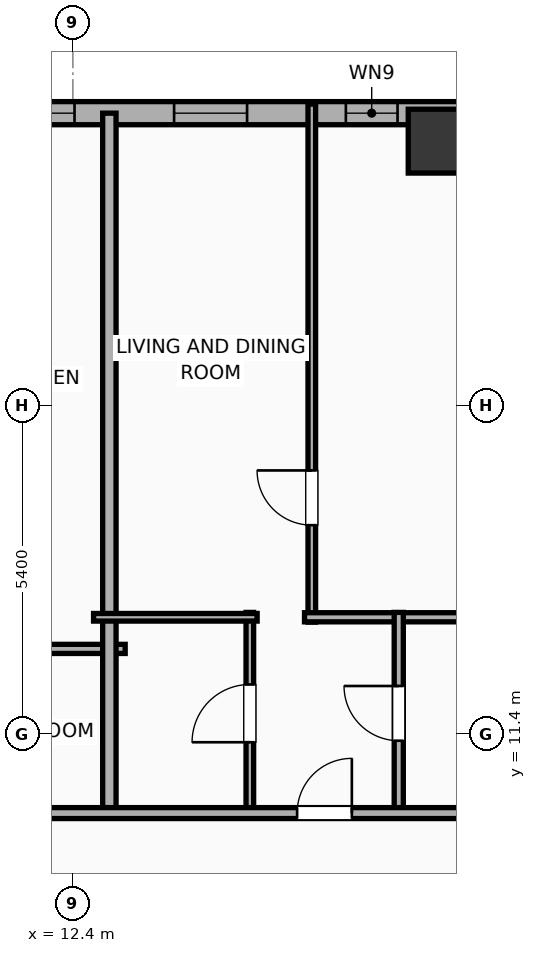
"""IFC4 building model, lengths in metres.
Left out: names, types, materials, properties, quantities, classifications, styles, units other than length and angle.
Written with IfcOpenShell. Run it as: python <this file> out.ifc"""

import sys

from ifc_helpers import new_model, si_unit, direction, frame, frame_2d, origin, origin_2d, place, context, subcontext, project, spatial, rectangle, hollow_rectangle, extrude, element, fill, save


model = new_model("IFC4")
c1 = context("Model", 3, precision=1e-05, world=origin(), true_north=direction((0.0, 1.0)))
c2 = subcontext(c1, "Body", "Model", "MODEL_VIEW")
j1 = project(units=[si_unit("LENGTHUNIT", "METRE"), si_unit("PLANEANGLEUNIT", "RADIAN")], contexts=[c1])
p1 = place(None, origin())
s1 = spatial("IfcSite", under=j1, at=p1, CompositionType="ELEMENT")
p2 = place(p1, origin())
s2 = spatial("IfcBuilding", under=s1, at=p2, CompositionType="ELEMENT")
p3 = place(p2, frame((0.0, 0.0, 124.8)))
s3 = spatial("IfcBuildingStorey", under=s2, at=p3, CompositionType="ELEMENT", Elevation=124.8)
p4 = place(p3, frame((18.44, 21.15, 0.0), z_axis=(0.0, 0.0, 1.0), x_axis=(1.0, 0.0, 0.0)))
e1 = element("IfcColumn", 1, at=p4, inside=s3, PredefinedType="COLUMN", context=c2, shape_type="SweptSolid", body=[
    extrude(hollow_rectangle(XDim=1.05, YDim=1.05, WallThickness=0.036, at=origin_2d()), origin(), (0.0, 0.0, 1.0), 3.9),
])
p5 = place(p3, frame((-25.381, 21.61, 0.0), z_axis=(0.0, 0.0, 1.0), x_axis=(1.0, 0.0, 0.0)))
e2 = element("IfcWall", 2, at=p5, inside=s3, PredefinedType="ELEMENTEDWALL", context=c2, shape_type="SweptSolid", body=[
    extrude(rectangle(XDim=54.763, YDim=0.38, at=frame_2d((27.381, 0.0))), origin(), (0.0, 0.0, 1.0), 3.65),
])
p6 = place(p5, frame((4.795, 0.0, 0.75)))
e3 = element("IfcOpeningElement", 3, at=p6, cuts=e2, PredefinedType="OPENING", context=c2, shape_type="SweptSolid", body=[
    extrude(rectangle(XDim=2.4, YDim=2.1, at=frame_2d((1.2, 1.05))), frame((0.0, 0.2, 0.0), z_axis=(0.0, -1.0, 0.0), x_axis=(1.0, 0.0, 0.0)), (0.0, 0.0, 1.0), 0.4),
])
p7 = place(p5, frame((45.867, 0.0, 0.75)))
e4 = element("IfcOpeningElement", 4, at=p7, cuts=e2, PredefinedType="OPENING", context=c2, shape_type="SweptSolid", body=[
    extrude(rectangle(XDim=2.4, YDim=2.1, at=frame_2d((1.2, 1.05))), frame((0.0, 0.2, 0.0), z_axis=(0.0, -1.0, 0.0), x_axis=(1.0, 0.0, 0.0)), (0.0, 0.0, 1.0), 0.4),
])
p8 = place(p5, frame((2.408, 0.0, 0.75)))
e5 = element("IfcOpeningElement", 5, at=p8, cuts=e2, PredefinedType="OPENING", context=c2, shape_type="SweptSolid", body=[
    extrude(rectangle(XDim=1.2, YDim=2.05, at=frame_2d((0.6, 1.025))), frame((0.0, 0.2, 0.0), z_axis=(0.0, -1.0, 0.0), x_axis=(1.0, 0.0, 0.0)), (0.0, 0.0, 1.0), 0.4),
])
p9 = place(p5, frame((8.952, 0.0, 0.75)))
e6 = element("IfcOpeningElement", 6, at=p9, cuts=e2, PredefinedType="OPENING", context=c2, shape_type="SweptSolid", body=[
    extrude(rectangle(XDim=1.2, YDim=2.05, at=frame_2d((0.6, 1.025))), frame((0.0, 0.2, 0.0), z_axis=(0.0, -1.0, 0.0), x_axis=(1.0, 0.0, 0.0)), (0.0, 0.0, 1.0), 0.4),
])
p10 = place(p5, frame((17.132, 0.0, 0.75)))
e7 = element("IfcOpeningElement", 7, at=p10, cuts=e2, PredefinedType="OPENING", context=c2, shape_type="SweptSolid", body=[
    extrude(rectangle(XDim=1.2, YDim=2.05, at=frame_2d((0.6, 1.025))), frame((0.0, 0.2, 0.0), z_axis=(0.0, -1.0, 0.0), x_axis=(1.0, 0.0, 0.0)), (0.0, 0.0, 1.0), 0.4),
])
p11 = place(p5, frame((14.007, 0.0, 0.75)))
e8 = element("IfcOpeningElement", 8, at=p11, cuts=e2, PredefinedType="OPENING", context=c2, shape_type="SweptSolid", body=[
    extrude(rectangle(XDim=1.2, YDim=2.05, at=frame_2d((0.6, 1.025))), frame((0.0, 0.2, 0.0), z_axis=(0.0, -1.0, 0.0), x_axis=(1.0, 0.0, 0.0)), (0.0, 0.0, 1.0), 0.4),
])
p12 = place(p5, frame((22.636, 0.0, 0.75)))
e9 = element("IfcOpeningElement", 9, at=p12, cuts=e2, PredefinedType="OPENING", context=c2, shape_type="SweptSolid", body=[
    extrude(rectangle(XDim=1.2, YDim=2.05, at=frame_2d((0.6, 1.025))), frame((0.0, 0.2, 0.0), z_axis=(0.0, -1.0, 0.0), x_axis=(1.0, 0.0, 0.0)), (0.0, 0.0, 1.0), 0.4),
])
p13 = place(p5, frame((27.129, 0.0, 0.75)))
e10 = element("IfcOpeningElement", 10, at=p13, cuts=e2, PredefinedType="OPENING", context=c2, shape_type="SweptSolid", body=[
    extrude(rectangle(XDim=1.2, YDim=2.05, at=frame_2d((0.6, 1.025))), frame((0.0, 0.2, 0.0), z_axis=(0.0, -1.0, 0.0), x_axis=(1.0, 0.0, 0.0)), (0.0, 0.0, 1.0), 0.4),
])
p14 = place(p5, frame((30.254, 0.0, 0.75)))
e11 = element("IfcOpeningElement", 11, at=p14, cuts=e2, PredefinedType="OPENING", context=c2, shape_type="SweptSolid", body=[
    extrude(rectangle(XDim=1.2, YDim=2.05, at=frame_2d((0.6, 1.025))), frame((0.0, 0.2, 0.0), z_axis=(0.0, -1.0, 0.0), x_axis=(1.0, 0.0, 0.0)), (0.0, 0.0, 1.0), 0.4),
])
p15 = place(p5, frame((33.603, 0.0, 0.75)))
e12 = element("IfcOpeningElement", 12, at=p15, cuts=e2, PredefinedType="OPENING", context=c2, shape_type="SweptSolid", body=[
    extrude(rectangle(XDim=1.2, YDim=2.05, at=frame_2d((0.6, 1.025))), frame((0.0, 0.2, 0.0), z_axis=(0.0, -1.0, 0.0), x_axis=(1.0, 0.0, 0.0)), (0.0, 0.0, 1.0), 0.4),
])
p16 = place(p5, frame((36.608, 0.0, 0.75)))
e13 = element("IfcOpeningElement", 13, at=p16, cuts=e2, PredefinedType="OPENING", context=c2, shape_type="SweptSolid", body=[
    extrude(rectangle(XDim=1.2, YDim=2.05, at=frame_2d((0.6, 1.025))), frame((0.0, 0.2, 0.0), z_axis=(0.0, -1.0, 0.0), x_axis=(1.0, 0.0, 0.0)), (0.0, 0.0, 1.0), 0.4),
])
p17 = place(p5, frame((39.446, 0.0, 0.75)))
e14 = element("IfcOpeningElement", 14, at=p17, cuts=e2, PredefinedType="OPENING", context=c2, shape_type="SweptSolid", body=[
    extrude(rectangle(XDim=1.2, YDim=2.05, at=frame_2d((0.6, 1.025))), frame((0.0, 0.2, 0.0), z_axis=(0.0, -1.0, 0.0), x_axis=(1.0, 0.0, 0.0)), (0.0, 0.0, 1.0), 0.4),
])
p18 = place(p5, frame((42.27, 0.0, 0.75)))
e15 = element("IfcOpeningElement", 15, at=p18, cuts=e2, PredefinedType="OPENING", context=c2, shape_type="SweptSolid", body=[
    extrude(rectangle(XDim=0.85, YDim=2.05, at=frame_2d((0.425, 1.025))), frame((0.0, 0.2, 0.0), z_axis=(0.0, -1.0, 0.0), x_axis=(1.0, 0.0, 0.0)), (0.0, 0.0, 1.0), 0.4),
])
p19 = place(p5, frame((49.554, 0.0, 0.75)))
e16 = element("IfcOpeningElement", 16, at=p19, cuts=e2, PredefinedType="OPENING", context=c2, shape_type="SweptSolid", body=[
    extrude(rectangle(XDim=1.2, YDim=2.05, at=frame_2d((0.6, 1.025))), frame((0.0, 0.2, 0.0), z_axis=(0.0, -1.0, 0.0), x_axis=(1.0, 0.0, 0.0)), (0.0, 0.0, 1.0), 0.4),
])
p20 = place(p5, frame((52.266, 0.0, 0.75)))
e17 = element("IfcOpeningElement", 17, at=p20, cuts=e2, PredefinedType="OPENING", context=c2, shape_type="SweptSolid", body=[
    extrude(rectangle(XDim=1.2, YDim=2.05, at=frame_2d((0.6, 1.025))), frame((0.0, 0.2, 0.0), z_axis=(0.0, -1.0, 0.0), x_axis=(1.0, 0.0, 0.0)), (0.0, 0.0, 1.0), 0.4),
])
p21 = place(p3, frame((10.574, 12.8, 0.0), z_axis=(0.0, 0.0, 1.0), x_axis=(1.0, 0.0, 0.0)))
e18 = element("IfcWall", 18, at=p21, inside=s3, PredefinedType="PLUMBINGWALL", context=c2, shape_type="SweptSolid", body=[
    extrude(rectangle(XDim=2.686, YDim=0.15, at=frame_2d((1.343, 0.0))), origin(), (0.0, 0.0, 1.0), 3.65),
])
p22 = place(p3, frame((13.0, 10.02, 0.0), z_axis=(0.0, 0.0, 1.0), x_axis=(0.0, 1.0, 0.0)))
e19 = element("IfcWall", 19, at=p22, inside=s3, PredefinedType="PARTITIONING", context=c2, shape_type="SweptSolid", body=[
    extrude(rectangle(XDim=11.59, YDim=0.22, at=frame_2d((5.795, 0.0))), origin(), (0.0, 0.0, 1.0), 3.65),
])
p23 = place(p3, frame((16.329, 13.24, 0.0), z_axis=(0.0, 0.0, 1.0), x_axis=(0.0, 1.0, 0.0)))
e20 = element("IfcWall", 20, at=p23, inside=s3, PredefinedType="PARTITIONING", context=c2, shape_type="SweptSolid", body=[
    extrude(rectangle(XDim=8.52, YDim=0.125, at=frame_2d((4.26, 0.0))), origin(), (0.0, 0.0, 1.0), 3.65),
])
p24 = place(p23, frame((1.595, 0.0, 0.0)))
e21 = element("IfcOpeningElement", 21, at=p24, cuts=e20, PredefinedType="OPENING", context=c2, shape_type="SweptSolid", body=[
    extrude(rectangle(XDim=0.9, YDim=2.05, at=frame_2d((0.45, 1.025))), frame((0.0, 0.073, 0.0), z_axis=(0.0, -1.0, 0.0), x_axis=(1.0, 0.0, 0.0)), (0.0, 0.0, 1.0), 0.145),
])
p25 = place(p3, frame((16.209, 13.32, 0.0), z_axis=(0.0, 0.0, 1.0), x_axis=(1.0, 0.0, 0.0)))
e22 = element("IfcWall", 22, at=p25, inside=s3, PredefinedType="PLUMBINGWALL", context=c2, shape_type="SweptSolid", body=[
    extrude(rectangle(XDim=3.605, YDim=0.15, at=frame_2d((1.802, 0.0))), origin(), (0.0, 0.0, 1.0), 3.65),
])
p26 = place(p3, frame((15.31, 10.08, 0.0), z_axis=(0.0, 0.0, 1.0), x_axis=(0.0, 1.0, 0.0)))
e23 = element("IfcWall", 23, at=p26, inside=s3, PredefinedType="PARTITIONING", context=c2, shape_type="SweptSolid", body=[
    extrude(rectangle(XDim=3.32, YDim=0.125, at=frame_2d((1.66, 0.0))), origin(), (0.0, 0.0, 1.0), 3.65),
])
p27 = place(p26, frame((1.185, 0.0, 0.0)))
e24 = element("IfcOpeningElement", 24, at=p27, cuts=e23, PredefinedType="OPENING", context=c2, shape_type="SweptSolid", body=[
    extrude(rectangle(XDim=0.95, YDim=2.05, at=frame_2d((0.475, 1.025))), frame((0.0, 0.073, 0.0), z_axis=(0.0, -1.0, 0.0), x_axis=(1.0, 0.0, 0.0)), (0.0, 0.0, 1.0), 0.145),
])
p28 = place(p3, frame((12.74, 13.32, 0.0), z_axis=(0.0, 0.0, 1.0), x_axis=(1.0, 0.0, 0.0)))
e25 = element("IfcWall", 25, at=p28, inside=s3, PredefinedType="PARTITIONING", context=c2, shape_type="SweptSolid", body=[
    extrude(rectangle(XDim=2.69, YDim=0.125, at=frame_2d((1.345, 0.0))), origin(), (0.0, 0.0, 1.0), 3.65),
])
p29 = place(p3, frame((17.759, 10.08, 0.0), z_axis=(0.0, 0.0, 1.0), x_axis=(0.0, 1.0, 0.0)))
e26 = element("IfcWall", 26, at=p29, inside=s3, PredefinedType="PLUMBINGWALL", context=c2, shape_type="SweptSolid", body=[
    extrude(rectangle(XDim=3.32, YDim=0.15, at=frame_2d((1.66, 0.0))), origin(), (0.0, 0.0, 1.0), 3.65),
])
p30 = place(p29, frame((1.21, 0.0, 0.0)))
e27 = element("IfcOpeningElement", 27, at=p30, cuts=e26, PredefinedType="OPENING", context=c2, shape_type="SweptSolid", body=[
    extrude(rectangle(XDim=0.9, YDim=2.05, at=frame_2d((0.45, 1.025))), frame((0.0, 0.085, 0.0), z_axis=(0.0, -1.0, 0.0), x_axis=(1.0, 0.0, 0.0)), (0.0, 0.0, 1.0), 0.17),
])
p31 = place(p3, frame((-29.21, 10.1, 0.0), z_axis=(0.0, 0.0, 1.0), x_axis=(1.0, 0.0, 0.0)))
e28 = element("IfcWall", 28, at=p31, inside=s3, PredefinedType="PARTITIONING", context=c2, shape_type="SweptSolid", body=[
    extrude(rectangle(XDim=62.42, YDim=0.18, at=frame_2d((31.21, 0.0))), origin(), (0.0, 0.0, 1.0), 3.65),
])
p32 = place(p31, frame((2.54, 0.0, 0.0)))
e29 = element("IfcOpeningElement", 29, at=p32, cuts=e28, PredefinedType="OPENING", context=c2, shape_type="SweptSolid", body=[
    extrude(rectangle(XDim=0.9, YDim=2.05, at=frame_2d((0.45, 1.025))), frame((0.0, 0.1, 0.0), z_axis=(0.0, -1.0, 0.0), x_axis=(1.0, 0.0, 0.0)), (0.0, 0.0, 1.0), 0.2),
])
p33 = place(p31, frame((9.1, 0.0, 0.0)))
e30 = element("IfcOpeningElement", 30, at=p33, cuts=e28, PredefinedType="OPENING", context=c2, shape_type="SweptSolid", body=[
    extrude(rectangle(XDim=1.15, YDim=2.05, at=frame_2d((0.575, 1.025))), frame((0.0, 0.1, 0.0), z_axis=(0.0, -1.0, 0.0), x_axis=(1.0, 0.0, 0.0)), (0.0, 0.0, 1.0), 0.2),
])
p34 = place(p31, frame((14.063, 0.0, 0.0)))
e31 = element("IfcOpeningElement", 31, at=p34, cuts=e28, PredefinedType="OPENING", context=c2, shape_type="SweptSolid", body=[
    extrude(rectangle(XDim=0.9, YDim=2.05, at=frame_2d((0.45, 1.025))), frame((0.0, 0.1, 0.0), z_axis=(0.0, -1.0, 0.0), x_axis=(1.0, 0.0, 0.0)), (0.0, 0.0, 1.0), 0.2),
])
p35 = place(p31, frame((20.954, 0.0, 0.0)))
e32 = element("IfcOpeningElement", 32, at=p35, cuts=e28, PredefinedType="OPENING", context=c2, shape_type="SweptSolid", body=[
    extrude(rectangle(XDim=1.15, YDim=2.05, at=frame_2d((0.575, 1.025))), frame((0.0, 0.1, 0.0), z_axis=(0.0, -1.0, 0.0), x_axis=(1.0, 0.0, 0.0)), (0.0, 0.0, 1.0), 0.2),
])
p36 = place(p31, frame((26.26, 0.0, 0.0)))
e33 = element("IfcOpeningElement", 33, at=p36, cuts=e28, PredefinedType="OPENING", context=c2, shape_type="SweptSolid", body=[
    extrude(rectangle(XDim=0.9, YDim=2.05, at=frame_2d((0.45, 1.025))), frame((0.0, 0.1, 0.0), z_axis=(0.0, -1.0, 0.0), x_axis=(1.0, 0.0, 0.0)), (0.0, 0.0, 1.0), 0.2),
])
p37 = place(p31, frame((31.01, 0.0, 0.0)))
e34 = element("IfcOpeningElement", 34, at=p37, cuts=e28, PredefinedType="OPENING", context=c2, shape_type="SweptSolid", body=[
    extrude(rectangle(XDim=1.15, YDim=2.05, at=frame_2d((0.575, 1.025))), frame((0.0, 0.1, 0.0), z_axis=(0.0, -1.0, 0.0), x_axis=(1.0, 0.0, 0.0)), (0.0, 0.0, 1.0), 0.2),
])
p38 = place(p31, frame((37.37, 0.0, 0.0)))
e35 = element("IfcOpeningElement", 35, at=p38, cuts=e28, PredefinedType="OPENING", context=c2, shape_type="SweptSolid", body=[
    extrude(rectangle(XDim=1.15, YDim=2.05, at=frame_2d((0.575, 1.025))), frame((0.0, 0.1, 0.0), z_axis=(0.0, -1.0, 0.0), x_axis=(1.0, 0.0, 0.0)), (0.0, 0.0, 1.0), 0.2),
])
p39 = place(p31, frame((45.298, 0.0, 0.0)))
e36 = element("IfcOpeningElement", 36, at=p39, cuts=e28, PredefinedType="OPENING", context=c2, shape_type="SweptSolid", body=[
    extrude(rectangle(XDim=0.9, YDim=2.05, at=frame_2d((0.45, 1.025))), frame((0.0, 0.1, 0.0), z_axis=(0.0, -1.0, 0.0), x_axis=(1.0, 0.0, 0.0)), (0.0, 0.0, 1.0), 0.2),
])
p40 = place(p31, frame((52.033, 0.0, 0.0)))
e37 = element("IfcOpeningElement", 37, at=p40, cuts=e28, PredefinedType="OPENING", context=c2, shape_type="SweptSolid", body=[
    extrude(rectangle(XDim=0.9, YDim=2.05, at=frame_2d((0.45, 1.025))), frame((0.0, 0.1, 0.0), z_axis=(0.0, -1.0, 0.0), x_axis=(1.0, 0.0, 0.0)), (0.0, 0.0, 1.0), 0.2),
])
p41 = place(p31, frame((58.805, 0.0, 0.0)))
e38 = element("IfcOpeningElement", 38, at=p41, cuts=e28, PredefinedType="OPENING", context=c2, shape_type="SweptSolid", body=[
    extrude(rectangle(XDim=0.9, YDim=2.05, at=frame_2d((0.45, 1.025))), frame((0.0, 0.1, 0.0), z_axis=(0.0, -1.0, 0.0), x_axis=(1.0, 0.0, 0.0)), (0.0, 0.0, 1.0), 0.2),
])
p42 = place(p16, origin())
e39 = element("IfcWindow", 39, at=p42, inside=s3, PartitioningType="SINGLE_PANEL", PredefinedType="WINDOW", context=c2, shape_type="SweptSolid", body=[
    extrude(rectangle(XDim=1.2, YDim=2.05, at=frame_2d((0.6, 1.025))), frame((0.0, 0.03, 0.0), z_axis=(0.0, -1.0, 0.0), x_axis=(1.0, 0.0, 0.0)), (0.0, 0.0, 1.0), 0.06),
])
fill(e13, e39)
p43 = place(p17, origin())
e40 = element("IfcWindow", 40, at=p43, inside=s3, PartitioningType="SINGLE_PANEL", PredefinedType="WINDOW", context=c2, shape_type="SweptSolid", body=[
    extrude(rectangle(XDim=1.2, YDim=2.05, at=frame_2d((0.6, 1.025))), frame((0.0, 0.03, 0.0), z_axis=(0.0, -1.0, 0.0), x_axis=(1.0, 0.0, 0.0)), (0.0, 0.0, 1.0), 0.06),
])
fill(e14, e40)
p44 = place(p18, origin())
e41 = element("IfcWindow", 41, at=p44, inside=s3, PartitioningType="SINGLE_PANEL", PredefinedType="WINDOW", context=c2, shape_type="SweptSolid", body=[
    extrude(rectangle(XDim=0.85, YDim=2.05, at=frame_2d((0.425, 1.025))), frame((0.0, 0.03, 0.0), z_axis=(0.0, -1.0, 0.0), x_axis=(1.0, 0.0, 0.0)), (0.0, 0.0, 1.0), 0.06),
])
fill(e15, e41)
p45 = place(p24, origin())
e42 = element("IfcDoor", 42, at=p45, inside=s3, OperationType="SINGLE_SWING_RIGHT", PredefinedType="DOOR", context=c2, shape_type="SweptSolid", body=[
    extrude(rectangle(XDim=0.9, YDim=2.05, at=frame_2d((0.45, 1.025))), frame((0.0, 0.025, 0.0), z_axis=(0.0, -1.0, 0.0), x_axis=(1.0, 0.0, 0.0)), (0.0, 0.0, 1.0), 0.05),
])
fill(e21, e42)
p46 = place(p27, origin())
e43 = element("IfcDoor", 43, at=p46, inside=s3, OperationType="SINGLE_SWING_LEFT", PredefinedType="DOOR", context=c2, shape_type="SweptSolid", body=[
    extrude(rectangle(XDim=0.95, YDim=2.05, at=frame_2d((0.475, 1.025))), frame((0.0, 0.025, 0.0), z_axis=(0.0, -1.0, 0.0), x_axis=(1.0, 0.0, 0.0)), (0.0, 0.0, 1.0), 0.05),
])
fill(e24, e43)
p47 = place(p30, origin())
e44 = element("IfcDoor", 44, at=p47, inside=s3, OperationType="SINGLE_SWING_RIGHT", PredefinedType="DOOR", context=c2, shape_type="SweptSolid", body=[
    extrude(rectangle(XDim=0.9, YDim=2.05, at=frame_2d((0.45, 1.025))), frame((0.0, 0.025, 0.0), z_axis=(0.0, -1.0, 0.0), x_axis=(1.0, 0.0, 0.0)), (0.0, 0.0, 1.0), 0.05),
])
fill(e27, e44)
p48 = place(p39, origin())
e45 = element("IfcDoor", 45, at=p48, inside=s3, OperationType="SINGLE_SWING_RIGHT", PredefinedType="DOOR", context=c2, shape_type="SweptSolid", body=[
    extrude(rectangle(XDim=0.9, YDim=2.05, at=frame_2d((0.45, 1.025))), frame((0.0, 0.025, 0.0), z_axis=(0.0, -1.0, 0.0), x_axis=(1.0, 0.0, 0.0)), (0.0, 0.0, 1.0), 0.05),
])
fill(e36, e45)
save(model, sys.argv[1])
